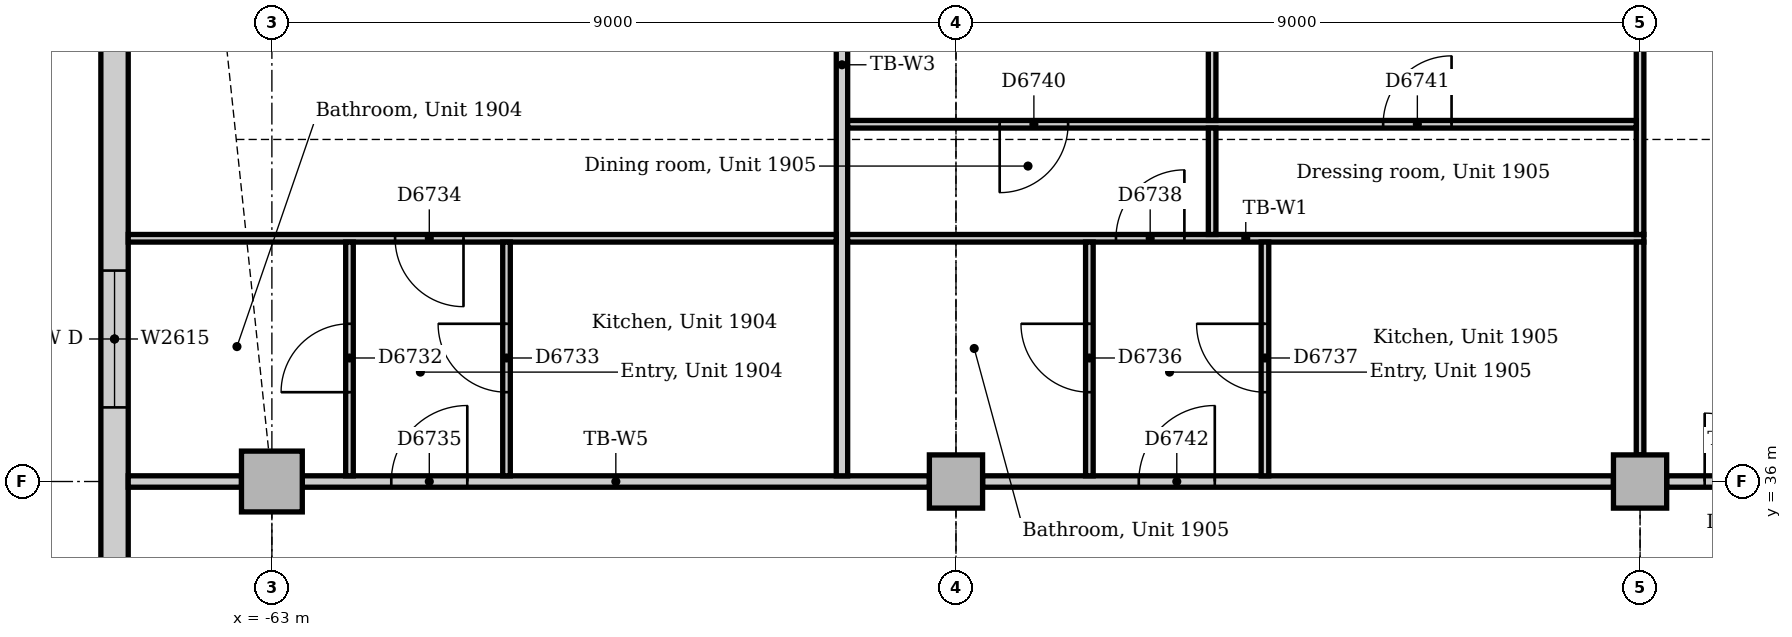
"""IFC4 building model, lengths in metres.
Left out: names, types, materials, properties, quantities, classifications, styles, units other than length and angle.
Written with IfcOpenShell. Run it as: python <this file> out.ifc"""

import sys

from ifc_helpers import new_model, si_unit, direction, frame, frame_2d, origin, origin_2d, place, context, subcontext, project, spatial, rectangle, extrude, element, fill, save


model = new_model("IFC4")
c1 = context("Model", 3, precision=1e-05, world=origin(), true_north=direction((0.0, 1.0)))
c2 = subcontext(c1, "Body", "Model", "MODEL_VIEW")
j1 = project(units=[si_unit("LENGTHUNIT", "METRE"), si_unit("PLANEANGLEUNIT", "RADIAN")], contexts=[c1])
p1 = place(None, origin())
s1 = spatial("IfcSite", under=j1, at=p1, CompositionType="ELEMENT")
p2 = place(p1, origin())
s2 = spatial("IfcBuilding", under=s1, at=p2, CompositionType="ELEMENT")
p3 = place(p2, frame((0.0, 0.0, 83.0)))
s3 = spatial("IfcBuildingStorey", under=s2, at=p3, CompositionType="ELEMENT", Elevation=83.0)
p4 = place(p3, frame((-63.0, 36.0, 0.0), z_axis=(0.0, 0.0, 1.0), x_axis=(1.0, 0.0, 0.0)))
e1 = element("IfcColumn", 1, at=p4, inside=s3, PredefinedType="COLUMN", context=c2, shape_type="SweptSolid", body=[
    extrude(rectangle(XDim=0.8, YDim=0.8, at=origin_2d()), origin(), (0.0, 0.0, 1.0), 3.85),
])
for number, where, z_axis, x_axis in (
    (2, (-54.0, 36.0, 0.0), (0.0, 0.0, 1.0), (1.0, 0.0, 0.0)),
    (3, (-45.0, 36.0, 0.0), (0.0, 0.0, 1.0), (1.0, 0.0, 0.0)),
):
    element("IfcColumn", number, at=place(p3, frame(where, z_axis=z_axis, x_axis=x_axis)), inside=s3, PredefinedType="COLUMN", context=c2, shape_type="SweptSolid", body=[
        extrude(rectangle(XDim=0.7, YDim=0.7, at=origin_2d()), origin(), (0.0, 0.0, 1.0), 3.85),
    ])
p5 = place(p3, frame((-65.07, 43.007, 0.0), z_axis=(0.0, 0.0, 1.0), x_axis=(0.0, -1.0, 0.0)))
e4 = element("IfcWall", 4, at=p5, inside=s3, PredefinedType="STANDARD", context=c2, shape_type="SweptSolid", body=[
    extrude(rectangle(XDim=23.765, YDim=0.36, at=frame_2d((11.882, 0.0))), origin(), (0.0, 0.0, 1.0), 3.85),
])
p6 = place(p5, frame((4.232, 0.0, 0.9)))
e5 = element("IfcOpeningElement", 5, at=p6, cuts=e4, PredefinedType="OPENING", context=c2, shape_type="SweptSolid", body=[
    extrude(rectangle(XDim=1.8, YDim=1.6, at=frame_2d((0.9, 0.8))), frame((0.0, 0.19, 0.0), z_axis=(0.0, -1.0, 0.0), x_axis=(1.0, 0.0, 0.0)), (0.0, 0.0, 1.0), 0.38),
])
p7 = place(p5, frame((9.332, 0.0, 0.9)))
e6 = element("IfcOpeningElement", 6, at=p7, cuts=e4, PredefinedType="OPENING", context=c2, shape_type="SweptSolid", body=[
    extrude(rectangle(XDim=1.8, YDim=1.6, at=frame_2d((0.9, 0.8))), frame((0.0, 0.19, 0.0), z_axis=(0.0, -1.0, 0.0), x_axis=(1.0, 0.0, 0.0)), (0.0, 0.0, 1.0), 0.38),
])
p8 = place(p5, frame((12.482, 0.0, 0.9)))
e7 = element("IfcOpeningElement", 7, at=p8, cuts=e4, PredefinedType="OPENING", context=c2, shape_type="SweptSolid", body=[
    extrude(rectangle(XDim=3.3, YDim=1.6, at=frame_2d((1.65, 0.8))), frame((0.0, 0.19, 0.0), z_axis=(0.0, -1.0, 0.0), x_axis=(1.0, 0.0, 0.0)), (0.0, 0.0, 1.0), 0.38),
])
p9 = place(p5, frame((16.982, 0.0, 0.9)))
e8 = element("IfcOpeningElement", 8, at=p9, cuts=e4, PredefinedType="OPENING", context=c2, shape_type="SweptSolid", body=[
    extrude(rectangle(XDim=3.3, YDim=1.6, at=frame_2d((1.65, 0.8))), frame((0.0, 0.19, 0.0), z_axis=(0.0, -1.0, 0.0), x_axis=(1.0, 0.0, 0.0)), (0.0, 0.0, 1.0), 0.38),
])
p10 = place(p3, frame((-44.65, 36.0, 0.0), z_axis=(0.0, 0.0, 1.0), x_axis=(1.0, 0.0, 0.0)))
e9 = element("IfcWall", 9, at=p10, inside=s3, PredefinedType="PARTITIONING", context=c2, shape_type="SweptSolid", body=[
    extrude(rectangle(XDim=1.925, YDim=0.15, at=frame_2d((0.963, 0.0))), origin(), (0.0, 0.0, 1.0), 3.602),
])
p11 = place(p10, frame((0.5, 0.0, 0.0)))
e10 = element("IfcOpeningElement", 10, at=p11, cuts=e9, PredefinedType="OPENING", context=c2, shape_type="SweptSolid", body=[
    extrude(rectangle(XDim=0.9, YDim=2.1, at=frame_2d((0.45, 1.05))), frame((0.0, 0.085, 0.0), z_axis=(0.0, -1.0, 0.0), x_axis=(1.0, 0.0, 0.0)), (0.0, 0.0, 1.0), 0.17),
])
p12 = place(p3, frame((-53.65, 36.0, 0.0), z_axis=(0.0, 0.0, 1.0), x_axis=(1.0, 0.0, 0.0)))
e11 = element("IfcWall", 11, at=p12, inside=s3, PredefinedType="PARTITIONING", context=c2, shape_type="SweptSolid", body=[
    extrude(rectangle(XDim=8.3, YDim=0.15, at=frame_2d((4.15, 0.0))), origin(), (0.0, 0.0, 1.0), 3.158),
])
p13 = place(p12, frame((2.055, 0.0, 0.0)))
e12 = element("IfcOpeningElement", 12, at=p13, cuts=e11, PredefinedType="OPENING", context=c2, shape_type="SweptSolid", body=[
    extrude(rectangle(XDim=1.0, YDim=2.1, at=frame_2d((0.5, 1.05))), frame((0.0, 0.085, 0.0), z_axis=(0.0, -1.0, 0.0), x_axis=(1.0, 0.0, 0.0)), (0.0, 0.0, 1.0), 0.17),
])
p14 = place(p3, frame((-62.6, 36.0, 0.0), z_axis=(0.0, 0.0, 1.0), x_axis=(1.0, 0.0, 0.0)))
e13 = element("IfcWall", 13, at=p14, inside=s3, PredefinedType="PARTITIONING", context=c2, shape_type="SweptSolid", body=[
    extrude(rectangle(XDim=8.25, YDim=0.15, at=frame_2d((4.125, 0.0))), origin(), (0.0, 0.0, 1.0), 3.158),
])
p15 = place(p14, frame((1.171, 0.0, 0.0)))
e14 = element("IfcOpeningElement", 14, at=p15, cuts=e13, PredefinedType="OPENING", context=c2, shape_type="SweptSolid", body=[
    extrude(rectangle(XDim=1.0, YDim=2.1, at=frame_2d((0.5, 1.05))), frame((0.0, 0.085, 0.0), z_axis=(0.0, -1.0, 0.0), x_axis=(1.0, 0.0, 0.0)), (0.0, 0.0, 1.0), 0.17),
])
p16 = place(p3, frame((-64.89, 36.0, 0.0), z_axis=(0.0, 0.0, 1.0), x_axis=(1.0, 0.0, 0.0)))
e15 = element("IfcWall", 15, at=p16, inside=s3, PredefinedType="PARTITIONING", context=c2, shape_type="SweptSolid", body=[
    extrude(rectangle(XDim=1.49, YDim=0.15, at=frame_2d((0.745, 0.0))), origin(), (0.0, 0.0, 1.0), 3.85),
])
p17 = place(p3, frame((-55.5, 36.075, 0.0), z_axis=(0.0, 0.0, 1.0), x_axis=(0.0, 1.0, 0.0)))
e16 = element("IfcWall", 16, at=p17, inside=s3, PredefinedType="PARTITIONING", context=c2, shape_type="SweptSolid", body=[
    extrude(rectangle(XDim=10.815, YDim=0.15, at=frame_2d((5.407, 0.0))), origin(), (0.0, 0.0, 1.0), 3.85),
])
p18 = place(p3, frame((-55.425, 39.2, 0.0), z_axis=(0.0, 0.0, 1.0), x_axis=(1.0, 0.0, 0.0)))
e17 = element("IfcWall", 17, at=p18, inside=s3, PredefinedType="PARTITIONING", context=c2, shape_type="SweptSolid", body=[
    extrude(rectangle(XDim=10.475, YDim=0.1, at=frame_2d((5.237, 0.0))), origin(), (0.0, 0.0, 1.0), 3.85),
])
p19 = place(p18, frame((3.53, 0.0, 0.0)))
e18 = element("IfcOpeningElement", 18, at=p19, cuts=e17, PredefinedType="OPENING", context=c2, shape_type="SweptSolid", body=[
    extrude(rectangle(XDim=0.9, YDim=2.1, at=frame_2d((0.45, 1.05))), frame((0.0, 0.06, 0.0), z_axis=(0.0, -1.0, 0.0), x_axis=(1.0, 0.0, 0.0)), (0.0, 0.0, 1.0), 0.12),
])
p20 = place(p3, frame((-64.89, 39.2, 0.0), z_axis=(0.0, 0.0, 1.0), x_axis=(1.0, 0.0, 0.0)))
e19 = element("IfcWall", 19, at=p20, inside=s3, PredefinedType="PARTITIONING", context=c2, shape_type="SweptSolid", body=[
    extrude(rectangle(XDim=9.315, YDim=0.1, at=frame_2d((4.657, 0.0))), origin(), (0.0, 0.0, 1.0), 3.85),
])
p21 = place(p20, frame((3.511, 0.0, 0.0)))
e20 = element("IfcOpeningElement", 20, at=p21, cuts=e19, PredefinedType="OPENING", context=c2, shape_type="SweptSolid", body=[
    extrude(rectangle(XDim=0.9, YDim=2.1, at=frame_2d((0.45, 1.05))), frame((0.0, 0.06, 0.0), z_axis=(0.0, -1.0, 0.0), x_axis=(1.0, 0.0, 0.0)), (0.0, 0.0, 1.0), 0.12),
])
p22 = place(p3, frame((-45.0, 39.25, 0.0), z_axis=(0.0, 0.0, 1.0), x_axis=(0.0, 1.0, 0.0)))
e21 = element("IfcWall", 21, at=p22, inside=s3, PredefinedType="PARTITIONING", context=c2, shape_type="SweptSolid", body=[
    extrude(rectangle(XDim=6.7, YDim=0.1, at=frame_2d((3.35, 0.0))), origin(), (0.0, 0.0, 1.0), 3.256),
])
p23 = place(p3, frame((-45.0, 36.35, 0.0), z_axis=(0.0, 0.0, 1.0), x_axis=(0.0, 1.0, 0.0)))
e22 = element("IfcWall", 22, at=p23, inside=s3, PredefinedType="PARTITIONING", context=c2, shape_type="SweptSolid", body=[
    extrude(rectangle(XDim=2.8, YDim=0.1, at=frame_2d((1.4, 0.0))), origin(), (0.0, 0.0, 1.0), 3.256),
])
p24 = place(p3, frame((-55.425, 40.7, 0.0), z_axis=(0.0, 0.0, 1.0), x_axis=(1.0, 0.0, 0.0)))
e23 = element("IfcWall", 23, at=p24, inside=s3, PredefinedType="PARTITIONING", context=c2, shape_type="SweptSolid", body=[
    extrude(rectangle(XDim=10.375, YDim=0.1, at=frame_2d((5.188, 0.0))), origin(), (0.0, 0.0, 1.0), 3.85),
])
p25 = place(p24, frame((2.0, 0.0, 0.0)))
e24 = element("IfcOpeningElement", 24, at=p25, cuts=e23, PredefinedType="OPENING", context=c2, shape_type="SweptSolid", body=[
    extrude(rectangle(XDim=0.9, YDim=2.1, at=frame_2d((0.45, 1.05))), frame((0.0, 0.06, 0.0), z_axis=(0.0, -1.0, 0.0), x_axis=(1.0, 0.0, 0.0)), (0.0, 0.0, 1.0), 0.12),
])
p26 = place(p24, frame((7.045, 0.0, 0.0)))
e25 = element("IfcOpeningElement", 25, at=p26, cuts=e23, PredefinedType="OPENING", context=c2, shape_type="SweptSolid", body=[
    extrude(rectangle(XDim=0.9, YDim=2.1, at=frame_2d((0.45, 1.05))), frame((0.0, 0.06, 0.0), z_axis=(0.0, -1.0, 0.0), x_axis=(1.0, 0.0, 0.0)), (0.0, 0.0, 1.0), 0.12),
])
p27 = place(p3, frame((-50.63, 39.25, 0.0), z_axis=(0.0, 0.0, 1.0), x_axis=(0.0, 1.0, 0.0)))
e26 = element("IfcWall", 26, at=p27, inside=s3, PredefinedType="PARTITIONING", context=c2, shape_type="SweptSolid", body=[
    extrude(rectangle(XDim=1.4, YDim=0.1, at=frame_2d((0.7, 0.0))), origin(), (0.0, 0.0, 1.0), 3.85),
])
p28 = place(p3, frame((-50.63, 40.75, 0.0), z_axis=(0.0, 0.0, 1.0), x_axis=(0.0, 1.0, 0.0)))
e27 = element("IfcWall", 27, at=p28, inside=s3, PredefinedType="PARTITIONING", context=c2, shape_type="SweptSolid", body=[
    extrude(rectangle(XDim=6.14, YDim=0.1, at=frame_2d((3.07, 0.0))), origin(), (0.0, 0.0, 1.0), 3.85),
])
p29 = place(p28, frame((2.6, 0.0, 0.0)))
e28 = element("IfcOpeningElement", 28, at=p29, cuts=e27, PredefinedType="OPENING", context=c2, shape_type="SweptSolid", body=[
    extrude(rectangle(XDim=0.9, YDim=2.1, at=frame_2d((0.45, 1.05))), frame((0.0, 0.06, 0.0), z_axis=(0.0, -1.0, 0.0), x_axis=(1.0, 0.0, 0.0)), (0.0, 0.0, 1.0), 0.12),
])
p30 = place(p3, frame((-61.979, 36.075, 0.0), z_axis=(0.0, 0.0, 1.0), x_axis=(0.0, 1.0, 0.0)))
e29 = element("IfcWall", 29, at=p30, inside=s3, PredefinedType="PARTITIONING", context=c2, shape_type="SweptSolid", body=[
    extrude(rectangle(XDim=3.075, YDim=0.1, at=frame_2d((1.538, 0.0))), origin(), (0.0, 0.0, 1.0), 3.85),
])
p31 = place(p30, frame((1.1, 0.0, 0.0)))
e30 = element("IfcOpeningElement", 30, at=p31, cuts=e29, PredefinedType="OPENING", context=c2, shape_type="SweptSolid", body=[
    extrude(rectangle(XDim=0.9, YDim=2.1, at=frame_2d((0.45, 1.05))), frame((0.0, 0.06, 0.0), z_axis=(0.0, -1.0, 0.0), x_axis=(1.0, 0.0, 0.0)), (0.0, 0.0, 1.0), 0.12),
])
p32 = place(p3, frame((-59.913, 36.075, 0.0), z_axis=(0.0, 0.0, 1.0), x_axis=(0.0, 1.0, 0.0)))
e31 = element("IfcWall", 31, at=p32, inside=s3, PredefinedType="PARTITIONING", context=c2, shape_type="SweptSolid", body=[
    extrude(rectangle(XDim=3.075, YDim=0.1, at=frame_2d((1.538, 0.0))), origin(), (0.0, 0.0, 1.0), 3.85),
])
p33 = place(p32, frame((1.1, 0.0, 0.0)))
e32 = element("IfcOpeningElement", 32, at=p33, cuts=e31, PredefinedType="OPENING", context=c2, shape_type="SweptSolid", body=[
    extrude(rectangle(XDim=0.9, YDim=2.1, at=frame_2d((0.45, 1.05))), frame((0.0, 0.06, 0.0), z_axis=(0.0, -1.0, 0.0), x_axis=(1.0, 0.0, 0.0)), (0.0, 0.0, 1.0), 0.12),
])
p34 = place(p3, frame((-52.245, 36.075, 0.0), z_axis=(0.0, 0.0, 1.0), x_axis=(0.0, 1.0, 0.0)))
e33 = element("IfcWall", 33, at=p34, inside=s3, PredefinedType="PARTITIONING", context=c2, shape_type="SweptSolid", body=[
    extrude(rectangle(XDim=3.075, YDim=0.1, at=frame_2d((1.538, 0.0))), origin(), (0.0, 0.0, 1.0), 3.85),
])
p35 = place(p34, frame((1.1, 0.0, 0.0)))
e34 = element("IfcOpeningElement", 34, at=p35, cuts=e33, PredefinedType="OPENING", context=c2, shape_type="SweptSolid", body=[
    extrude(rectangle(XDim=0.9, YDim=2.1, at=frame_2d((0.45, 1.05))), frame((0.0, 0.06, 0.0), z_axis=(0.0, -1.0, 0.0), x_axis=(1.0, 0.0, 0.0)), (0.0, 0.0, 1.0), 0.12),
])
p36 = place(p3, frame((-49.935, 36.075, 0.0), z_axis=(0.0, 0.0, 1.0), x_axis=(0.0, 1.0, 0.0)))
e35 = element("IfcWall", 35, at=p36, inside=s3, PredefinedType="PARTITIONING", context=c2, shape_type="SweptSolid", body=[
    extrude(rectangle(XDim=3.075, YDim=0.1, at=frame_2d((1.538, 0.0))), origin(), (0.0, 0.0, 1.0), 3.85),
])
p37 = place(p36, frame((1.1, 0.0, 0.0)))
e36 = element("IfcOpeningElement", 36, at=p37, cuts=e35, PredefinedType="OPENING", context=c2, shape_type="SweptSolid", body=[
    extrude(rectangle(XDim=0.9, YDim=2.1, at=frame_2d((0.45, 1.05))), frame((0.0, 0.06, 0.0), z_axis=(0.0, -1.0, 0.0), x_axis=(1.0, 0.0, 0.0)), (0.0, 0.0, 1.0), 0.12),
])
p38 = place(p6, origin())
e37 = element("IfcWindow", 37, at=p38, inside=s3, PartitioningType="SINGLE_PANEL", PredefinedType="WINDOW", context=c2, shape_type="SweptSolid", body=[
    extrude(rectangle(XDim=1.8, YDim=1.6, at=frame_2d((0.9, 0.8))), frame((0.0, 0.13, 0.0), z_axis=(0.0, -1.0, 0.0), x_axis=(1.0, 0.0, 0.0)), (0.0, 0.0, 1.0), 0.06),
])
fill(e5, e37)
p39 = place(p11, origin())
e38 = element("IfcDoor", 38, at=p39, inside=s3, OperationType="SINGLE_SWING_LEFT", PredefinedType="DOOR", context=c2, shape_type="SweptSolid", body=[
    extrude(rectangle(XDim=0.9, YDim=2.1, at=frame_2d((0.45, 1.05))), frame((0.0, 0.025, 0.0), z_axis=(0.0, -1.0, 0.0), x_axis=(1.0, 0.0, 0.0)), (0.0, 0.0, 1.0), 0.05),
])
fill(e10, e38)
p40 = place(p31, origin())
e39 = element("IfcDoor", 39, at=p40, inside=s3, OperationType="SINGLE_SWING_LEFT", PredefinedType="DOOR", context=c2, shape_type="SweptSolid", body=[
    extrude(rectangle(XDim=0.9, YDim=2.1, at=frame_2d((0.45, 1.05))), frame((0.0, 0.025, 0.0), z_axis=(0.0, -1.0, 0.0), x_axis=(1.0, 0.0, 0.0)), (0.0, 0.0, 1.0), 0.05),
])
fill(e30, e39)
p41 = place(p33, origin())
e40 = element("IfcDoor", 40, at=p41, inside=s3, OperationType="SINGLE_SWING_RIGHT", PredefinedType="DOOR", context=c2, shape_type="SweptSolid", body=[
    extrude(rectangle(XDim=0.9, YDim=2.1, at=frame_2d((0.45, 1.05))), frame((0.0, 0.025, 0.0), z_axis=(0.0, -1.0, 0.0), x_axis=(1.0, 0.0, 0.0)), (0.0, 0.0, 1.0), 0.05),
])
fill(e32, e40)
p42 = place(p21, frame((0.9, 0.0, 0.0), z_axis=(0.0, 0.0, 1.0), x_axis=(-1.0, 0.0, 0.0)))
e41 = element("IfcDoor", 41, at=p42, inside=s3, OperationType="SINGLE_SWING_LEFT", PredefinedType="DOOR", context=c2, shape_type="SweptSolid", body=[
    extrude(rectangle(XDim=0.9, YDim=2.1, at=frame_2d((0.45, 1.05))), frame((0.0, 0.025, 0.0), z_axis=(0.0, -1.0, 0.0), x_axis=(1.0, 0.0, 0.0)), (0.0, 0.0, 1.0), 0.05),
])
fill(e20, e41)
p43 = place(p15, origin())
e42 = element("IfcDoor", 42, at=p43, inside=s3, OperationType="SINGLE_SWING_RIGHT", PredefinedType="DOOR", context=c2, shape_type="SweptSolid", body=[
    extrude(rectangle(XDim=1.0, YDim=2.1, at=frame_2d((0.5, 1.05))), frame((0.0, 0.025, 0.0), z_axis=(0.0, -1.0, 0.0), x_axis=(1.0, 0.0, 0.0)), (0.0, 0.0, 1.0), 0.05),
])
fill(e14, e42)
p44 = place(p35, origin())
e43 = element("IfcDoor", 43, at=p44, inside=s3, OperationType="SINGLE_SWING_RIGHT", PredefinedType="DOOR", context=c2, shape_type="SweptSolid", body=[
    extrude(rectangle(XDim=0.9, YDim=2.1, at=frame_2d((0.45, 1.05))), frame((0.0, 0.025, 0.0), z_axis=(0.0, -1.0, 0.0), x_axis=(1.0, 0.0, 0.0)), (0.0, 0.0, 1.0), 0.05),
])
fill(e34, e43)
p45 = place(p37, origin())
e44 = element("IfcDoor", 44, at=p45, inside=s3, OperationType="SINGLE_SWING_RIGHT", PredefinedType="DOOR", context=c2, shape_type="SweptSolid", body=[
    extrude(rectangle(XDim=0.9, YDim=2.1, at=frame_2d((0.45, 1.05))), frame((0.0, 0.025, 0.0), z_axis=(0.0, -1.0, 0.0), x_axis=(1.0, 0.0, 0.0)), (0.0, 0.0, 1.0), 0.05),
])
fill(e36, e44)
p46 = place(p19, origin())
e45 = element("IfcDoor", 45, at=p46, inside=s3, OperationType="SINGLE_SWING_RIGHT", PredefinedType="DOOR", context=c2, shape_type="SweptSolid", body=[
    extrude(rectangle(XDim=0.9, YDim=2.1, at=frame_2d((0.45, 1.05))), frame((0.0, 0.025, 0.0), z_axis=(0.0, -1.0, 0.0), x_axis=(1.0, 0.0, 0.0)), (0.0, 0.0, 1.0), 0.05),
])
fill(e18, e45)
p47 = place(p25, frame((0.9, 0.0, 0.0), z_axis=(0.0, 0.0, 1.0), x_axis=(-1.0, 0.0, 0.0)))
e46 = element("IfcDoor", 46, at=p47, inside=s3, OperationType="SINGLE_SWING_RIGHT", PredefinedType="DOOR", context=c2, shape_type="SweptSolid", body=[
    extrude(rectangle(XDim=0.9, YDim=2.1, at=frame_2d((0.45, 1.05))), frame((0.0, 0.025, 0.0), z_axis=(0.0, -1.0, 0.0), x_axis=(1.0, 0.0, 0.0)), (0.0, 0.0, 1.0), 0.05),
])
fill(e24, e46)
p48 = place(p26, origin())
e47 = element("IfcDoor", 47, at=p48, inside=s3, OperationType="SINGLE_SWING_RIGHT", PredefinedType="DOOR", context=c2, shape_type="SweptSolid", body=[
    extrude(rectangle(XDim=0.9, YDim=2.1, at=frame_2d((0.45, 1.05))), frame((0.0, 0.025, 0.0), z_axis=(0.0, -1.0, 0.0), x_axis=(1.0, 0.0, 0.0)), (0.0, 0.0, 1.0), 0.05),
])
fill(e25, e47)
p49 = place(p13, origin())
e48 = element("IfcDoor", 48, at=p49, inside=s3, OperationType="SINGLE_SWING_RIGHT", PredefinedType="DOOR", context=c2, shape_type="SweptSolid", body=[
    extrude(rectangle(XDim=1.0, YDim=2.1, at=frame_2d((0.5, 1.05))), frame((0.0, 0.025, 0.0), z_axis=(0.0, -1.0, 0.0), x_axis=(1.0, 0.0, 0.0)), (0.0, 0.0, 1.0), 0.05),
])
fill(e12, e48)
save(model, sys.argv[1])
